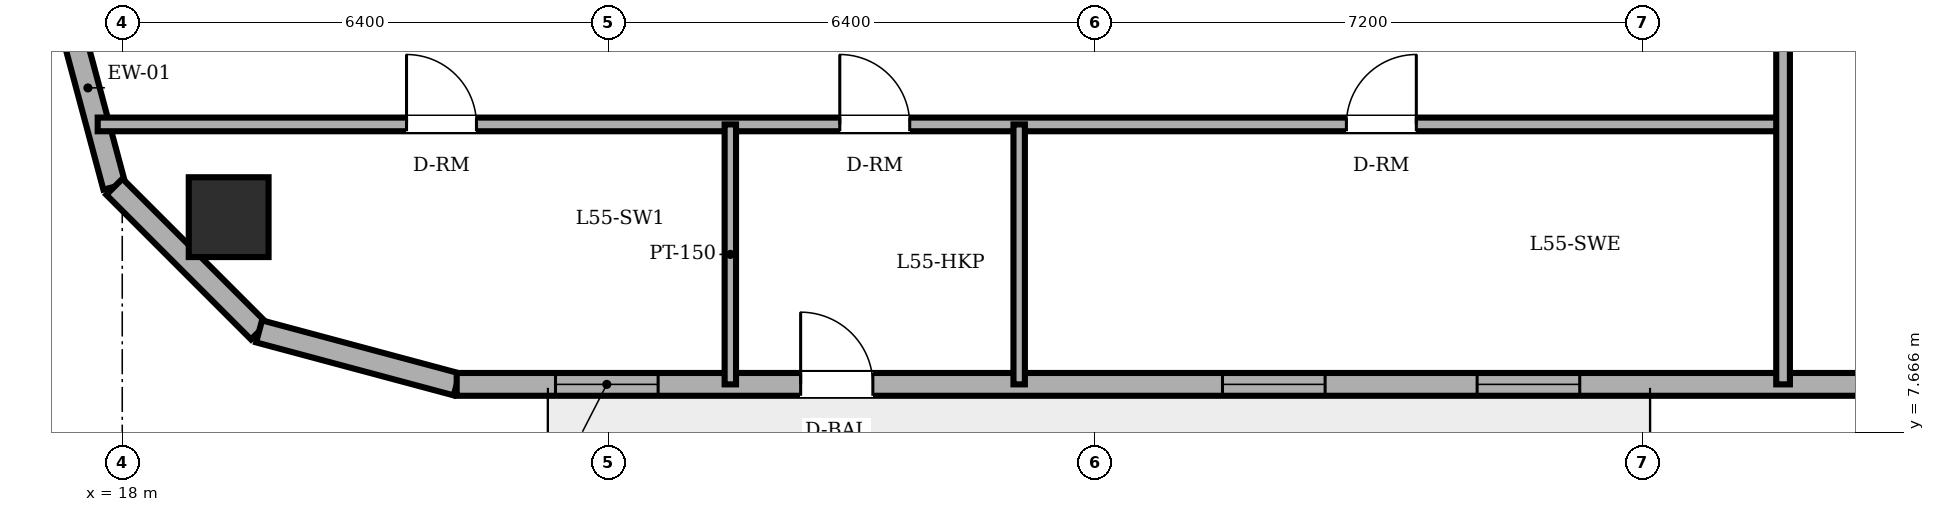
"""IFC4 building model, lengths in metres.
Left out: names, types, materials, properties, quantities, classifications, styles, units other than length and angle.
Written with IfcOpenShell. Run it as: python <this file> out.ifc"""

import sys

from ifc_helpers import new_model, si_unit, direction, frame, frame_2d, origin, origin_2d, place, context, subcontext, project, spatial, rectangle, circle, extrude, element, fill, save


model = new_model("IFC4")
c1 = context("Model", 3, precision=1e-05, world=origin(), true_north=direction((0.0, 1.0)))
c2 = subcontext(c1, "Body", "Model", "MODEL_VIEW")
j1 = project(units=[si_unit("LENGTHUNIT", "METRE"), si_unit("PLANEANGLEUNIT", "RADIAN")], contexts=[c1])
p1 = place(None, origin())
s1 = spatial("IfcSite", under=j1, at=p1, CompositionType="ELEMENT")
p2 = place(p1, origin())
s2 = spatial("IfcBuilding", under=s1, at=p2, CompositionType="ELEMENT")
p3 = place(p2, frame((0.0, 0.0, 212.1)))
s3 = spatial("IfcBuildingStorey", under=s2, at=p3, CompositionType="ELEMENT", Elevation=212.1)
p4 = place(p3, frame((19.4, 10.5, 0.0), z_axis=(0.0, 0.0, 1.0), x_axis=(1.0, 0.0, 0.0)))
e1 = element("IfcColumn", 1, at=p4, inside=s3, PredefinedType="COLUMN", context=c2, shape_type="SweptSolid", body=[
    extrude(circle(Radius=0.525, at=origin_2d()), origin(), (0.0, 0.0, 1.0), 3.6),
])
p5 = place(p3, frame((17.2, 13.5, 0.0), z_axis=(0.0, 0.0, 1.0), x_axis=(0.258932525951, -0.965895412042, 0.0)))
e2 = element("IfcWall", 2, at=p5, inside=s3, PredefinedType="SOLIDWALL", context=c2, shape_type="SweptSolid", body=[
    extrude(rectangle(XDim=2.692, YDim=0.3, at=frame_2d((1.346, 0.0))), origin(), (0.0, 0.0, 1.0), 3.4),
])
p6 = place(p3, frame((17.897, 10.9, 0.0), z_axis=(0.0, 0.0, 1.0), x_axis=(0.707152139074, -0.70706142039, 0.0)))
e3 = element("IfcWall", 3, at=p6, inside=s3, PredefinedType="SOLIDWALL", context=c2, shape_type="SweptSolid", body=[
    extrude(rectangle(XDim=2.691, YDim=0.3, at=frame_2d((1.346, 0.0))), origin(), (0.0, 0.0, 1.0), 3.4),
])
p7 = place(p3, frame((19.8, 8.997, 0.0), z_axis=(0.0, 0.0, 1.0), x_axis=(0.965889330541, -0.258955210695, 0.0)))
e4 = element("IfcWall", 4, at=p7, inside=s3, PredefinedType="SOLIDWALL", context=c2, shape_type="SweptSolid", body=[
    extrude(rectangle(XDim=2.692, YDim=0.3, at=frame_2d((1.346, 0.0))), origin(), (0.0, 0.0, 1.0), 3.4),
])
p8 = place(p3, frame((22.4, 8.3, 0.0), z_axis=(0.0, 0.0, 1.0), x_axis=(1.0, 0.0, 0.0)))
e5 = element("IfcWall", 5, at=p8, inside=s3, PredefinedType="SOLIDWALL", context=c2, shape_type="SweptSolid", body=[
    extrude(rectangle(XDim=32.485, YDim=0.3, at=frame_2d((16.243, 0.0))), origin(), (0.0, 0.0, 1.0), 3.4),
])
p9 = place(p8, frame((4.525, 0.0, 0.0)))
e6 = element("IfcOpeningElement", 6, at=p9, cuts=e5, PredefinedType="OPENING", context=c2, shape_type="SweptSolid", body=[
    extrude(rectangle(XDim=0.95, YDim=2.2, at=frame_2d((0.475, 1.1))), frame((0.0, 0.16, 0.0), z_axis=(0.0, -1.0, 0.0), x_axis=(1.0, 0.0, 0.0)), (0.0, 0.0, 1.0), 0.32),
])
p10 = place(p8, frame((1.3, 0.0, 0.85)))
e7 = element("IfcOpeningElement", 7, at=p10, cuts=e5, PredefinedType="OPENING", context=c2, shape_type="SweptSolid", body=[
    extrude(rectangle(XDim=1.35, YDim=1.55, at=frame_2d((0.675, 0.775))), frame((0.0, 0.16, 0.0), z_axis=(0.0, -1.0, 0.0), x_axis=(1.0, 0.0, 0.0)), (0.0, 0.0, 1.0), 0.32),
])
p11 = place(p8, frame((10.075, 0.0, 0.85)))
e8 = element("IfcOpeningElement", 8, at=p11, cuts=e5, PredefinedType="OPENING", context=c2, shape_type="SweptSolid", body=[
    extrude(rectangle(XDim=1.35, YDim=1.55, at=frame_2d((0.675, 0.775))), frame((0.0, 0.16, 0.0), z_axis=(0.0, -1.0, 0.0), x_axis=(1.0, 0.0, 0.0)), (0.0, 0.0, 1.0), 0.32),
])
p12 = place(p8, frame((13.425, 0.0, 0.85)))
e9 = element("IfcOpeningElement", 9, at=p12, cuts=e5, PredefinedType="OPENING", context=c2, shape_type="SweptSolid", body=[
    extrude(rectangle(XDim=1.35, YDim=1.55, at=frame_2d((0.675, 0.775))), frame((0.0, 0.16, 0.0), z_axis=(0.0, -1.0, 0.0), x_axis=(1.0, 0.0, 0.0)), (0.0, 0.0, 1.0), 0.32),
])
p13 = place(p8, frame((19.386, 0.0, 0.85)))
e10 = element("IfcOpeningElement", 10, at=p13, cuts=e5, PredefinedType="OPENING", context=c2, shape_type="SweptSolid", body=[
    extrude(rectangle(XDim=1.35, YDim=1.55, at=frame_2d((0.675, 0.775))), frame((0.0, 0.16, 0.0), z_axis=(0.0, -1.0, 0.0), x_axis=(1.0, 0.0, 0.0)), (0.0, 0.0, 1.0), 0.32),
])
p14 = place(p8, frame((21.996, 0.0, 0.85)))
e11 = element("IfcOpeningElement", 11, at=p14, cuts=e5, PredefinedType="OPENING", context=c2, shape_type="SweptSolid", body=[
    extrude(rectangle(XDim=1.35, YDim=1.55, at=frame_2d((0.675, 0.775))), frame((0.0, 0.16, 0.0), z_axis=(0.0, -1.0, 0.0), x_axis=(1.0, 0.0, 0.0)), (0.0, 0.0, 1.0), 0.32),
])
p15 = place(p8, frame((26.891, 0.0, 0.85)))
e12 = element("IfcOpeningElement", 12, at=p15, cuts=e5, PredefinedType="OPENING", context=c2, shape_type="SweptSolid", body=[
    extrude(rectangle(XDim=1.35, YDim=1.55, at=frame_2d((0.675, 0.775))), frame((0.0, 0.16, 0.0), z_axis=(0.0, -1.0, 0.0), x_axis=(1.0, 0.0, 0.0)), (0.0, 0.0, 1.0), 0.32),
])
p16 = place(p8, frame((29.176, 0.0, 0.85)))
e13 = element("IfcOpeningElement", 13, at=p16, cuts=e5, PredefinedType="OPENING", context=c2, shape_type="SweptSolid", body=[
    extrude(rectangle(XDim=1.35, YDim=1.55, at=frame_2d((0.675, 0.775))), frame((0.0, 0.16, 0.0), z_axis=(0.0, -1.0, 0.0), x_axis=(1.0, 0.0, 0.0)), (0.0, 0.0, 1.0), 0.32),
])
p17 = place(p3, frame((17.677, 11.72, 0.0), z_axis=(0.0, 0.0, 1.0), x_axis=(1.0, 0.0, 0.0)))
e14 = element("IfcWall", 14, at=p17, inside=s3, PredefinedType="PARTITIONING", context=c2, shape_type="SweptSolid", body=[
    extrude(rectangle(XDim=22.173, YDim=0.18, at=frame_2d((11.086, 0.0))), origin(), (0.0, 0.0, 1.0), 3.4),
])
p18 = place(p17, frame((9.763, 0.0, 0.0)))
e15 = element("IfcOpeningElement", 15, at=p18, cuts=e14, PredefinedType="OPENING", context=c2, shape_type="SweptSolid", body=[
    extrude(rectangle(XDim=0.92, YDim=2.1, at=frame_2d((0.46, 1.05))), frame((0.0, 0.1, 0.0), z_axis=(0.0, -1.0, 0.0), x_axis=(1.0, 0.0, 0.0)), (0.0, 0.0, 1.0), 0.2),
])
p19 = place(p17, frame((4.063, 0.0, 0.0)))
e16 = element("IfcOpeningElement", 16, at=p19, cuts=e14, PredefinedType="OPENING", context=c2, shape_type="SweptSolid", body=[
    extrude(rectangle(XDim=0.92, YDim=2.1, at=frame_2d((0.46, 1.05))), frame((0.0, 0.1, 0.0), z_axis=(0.0, -1.0, 0.0), x_axis=(1.0, 0.0, 0.0)), (0.0, 0.0, 1.0), 0.2),
])
p20 = place(p17, frame((16.428, 0.0, 0.0)))
e17 = element("IfcOpeningElement", 17, at=p20, cuts=e14, PredefinedType="OPENING", context=c2, shape_type="SweptSolid", body=[
    extrude(rectangle(XDim=0.92, YDim=2.1, at=frame_2d((0.46, 1.05))), frame((0.0, 0.1, 0.0), z_axis=(0.0, -1.0, 0.0), x_axis=(1.0, 0.0, 0.0)), (0.0, 0.0, 1.0), 0.2),
])
for number, where, z_axis, x_axis in (
    (18, (26.0, 8.3, 0.0), (0.0, 0.0, 1.0), (0.0, 1.0, 0.0)),
    (19, (29.8, 8.3, 0.0), (0.0, 0.0, 1.0), (0.0, 1.0, 0.0)),
):
    element("IfcWall", number, at=place(p3, frame(where, z_axis=z_axis, x_axis=x_axis)), inside=s3, PredefinedType="PARTITIONING", context=c2, shape_type="SweptSolid", body=[
        extrude(rectangle(XDim=3.42, YDim=0.15, at=frame_2d((1.71, 0.0))), origin(), (0.0, 0.0, 1.0), 3.4),
    ])
p21 = place(p3, frame((39.85, 8.3, 0.0), z_axis=(0.0, 0.0, 1.0), x_axis=(0.0, 1.0, 0.0)))
e20 = element("IfcWall", 20, at=p21, inside=s3, PredefinedType="PARTITIONING", context=c2, shape_type="SweptSolid", body=[
    extrude(rectangle(XDim=14.52, YDim=0.18, at=frame_2d((7.26, 0.0))), origin(), (0.0, 0.0, 1.0), 3.4),
])
p22 = place(p21, frame((8.25, 0.0, 0.0)))
e21 = element("IfcOpeningElement", 21, at=p22, cuts=e20, PredefinedType="OPENING", context=c2, shape_type="SweptSolid", body=[
    extrude(rectangle(XDim=0.92, YDim=2.1, at=frame_2d((0.46, 1.05))), frame((0.0, 0.1, 0.0), z_axis=(0.0, -1.0, 0.0), x_axis=(1.0, 0.0, 0.0)), (0.0, 0.0, 1.0), 0.2),
])
p23 = place(p9, origin())
e22 = element("IfcDoor", 22, at=p23, inside=s3, OperationType="SINGLE_SWING_LEFT", PredefinedType="DOOR", context=c2, shape_type="SweptSolid", body=[
    extrude(rectangle(XDim=0.95, YDim=2.2, at=frame_2d((0.475, 1.1))), frame((0.0, 0.025, 0.0), z_axis=(0.0, -1.0, 0.0), x_axis=(1.0, 0.0, 0.0)), (0.0, 0.0, 1.0), 0.05),
])
fill(e6, e22)
p24 = place(p10, origin())
e23 = element("IfcWindow", 23, at=p24, inside=s3, PartitioningType="SINGLE_PANEL", PredefinedType="WINDOW", context=c2, shape_type="SweptSolid", body=[
    extrude(rectangle(XDim=1.35, YDim=1.55, at=frame_2d((0.675, 0.775))), frame((0.0, 0.03, 0.0), z_axis=(0.0, -1.0, 0.0), x_axis=(1.0, 0.0, 0.0)), (0.0, 0.0, 1.0), 0.06),
])
fill(e7, e23)
p25 = place(p11, origin())
e24 = element("IfcWindow", 24, at=p25, inside=s3, PartitioningType="SINGLE_PANEL", PredefinedType="WINDOW", context=c2, shape_type="SweptSolid", body=[
    extrude(rectangle(XDim=1.35, YDim=1.55, at=frame_2d((0.675, 0.775))), frame((0.0, 0.03, 0.0), z_axis=(0.0, -1.0, 0.0), x_axis=(1.0, 0.0, 0.0)), (0.0, 0.0, 1.0), 0.06),
])
fill(e8, e24)
p26 = place(p12, origin())
e25 = element("IfcWindow", 25, at=p26, inside=s3, PartitioningType="SINGLE_PANEL", PredefinedType="WINDOW", context=c2, shape_type="SweptSolid", body=[
    extrude(rectangle(XDim=1.35, YDim=1.55, at=frame_2d((0.675, 0.775))), frame((0.0, 0.03, 0.0), z_axis=(0.0, -1.0, 0.0), x_axis=(1.0, 0.0, 0.0)), (0.0, 0.0, 1.0), 0.06),
])
fill(e9, e25)
p27 = place(p18, origin())
e26 = element("IfcDoor", 26, at=p27, inside=s3, OperationType="SINGLE_SWING_LEFT", PredefinedType="DOOR", context=c2, shape_type="SweptSolid", body=[
    extrude(rectangle(XDim=0.92, YDim=2.1, at=frame_2d((0.46, 1.05))), frame((0.0, 0.025, 0.0), z_axis=(0.0, -1.0, 0.0), x_axis=(1.0, 0.0, 0.0)), (0.0, 0.0, 1.0), 0.05),
])
fill(e15, e26)
p28 = place(p19, origin())
e27 = element("IfcDoor", 27, at=p28, inside=s3, OperationType="SINGLE_SWING_LEFT", PredefinedType="DOOR", context=c2, shape_type="SweptSolid", body=[
    extrude(rectangle(XDim=0.92, YDim=2.1, at=frame_2d((0.46, 1.05))), frame((0.0, 0.025, 0.0), z_axis=(0.0, -1.0, 0.0), x_axis=(1.0, 0.0, 0.0)), (0.0, 0.0, 1.0), 0.05),
])
fill(e16, e27)
p29 = place(p20, origin())
e28 = element("IfcDoor", 28, at=p29, inside=s3, OperationType="SINGLE_SWING_RIGHT", PredefinedType="DOOR", context=c2, shape_type="SweptSolid", body=[
    extrude(rectangle(XDim=0.92, YDim=2.1, at=frame_2d((0.46, 1.05))), frame((0.0, 0.025, 0.0), z_axis=(0.0, -1.0, 0.0), x_axis=(1.0, 0.0, 0.0)), (0.0, 0.0, 1.0), 0.05),
])
fill(e17, e28)
save(model, sys.argv[1])
